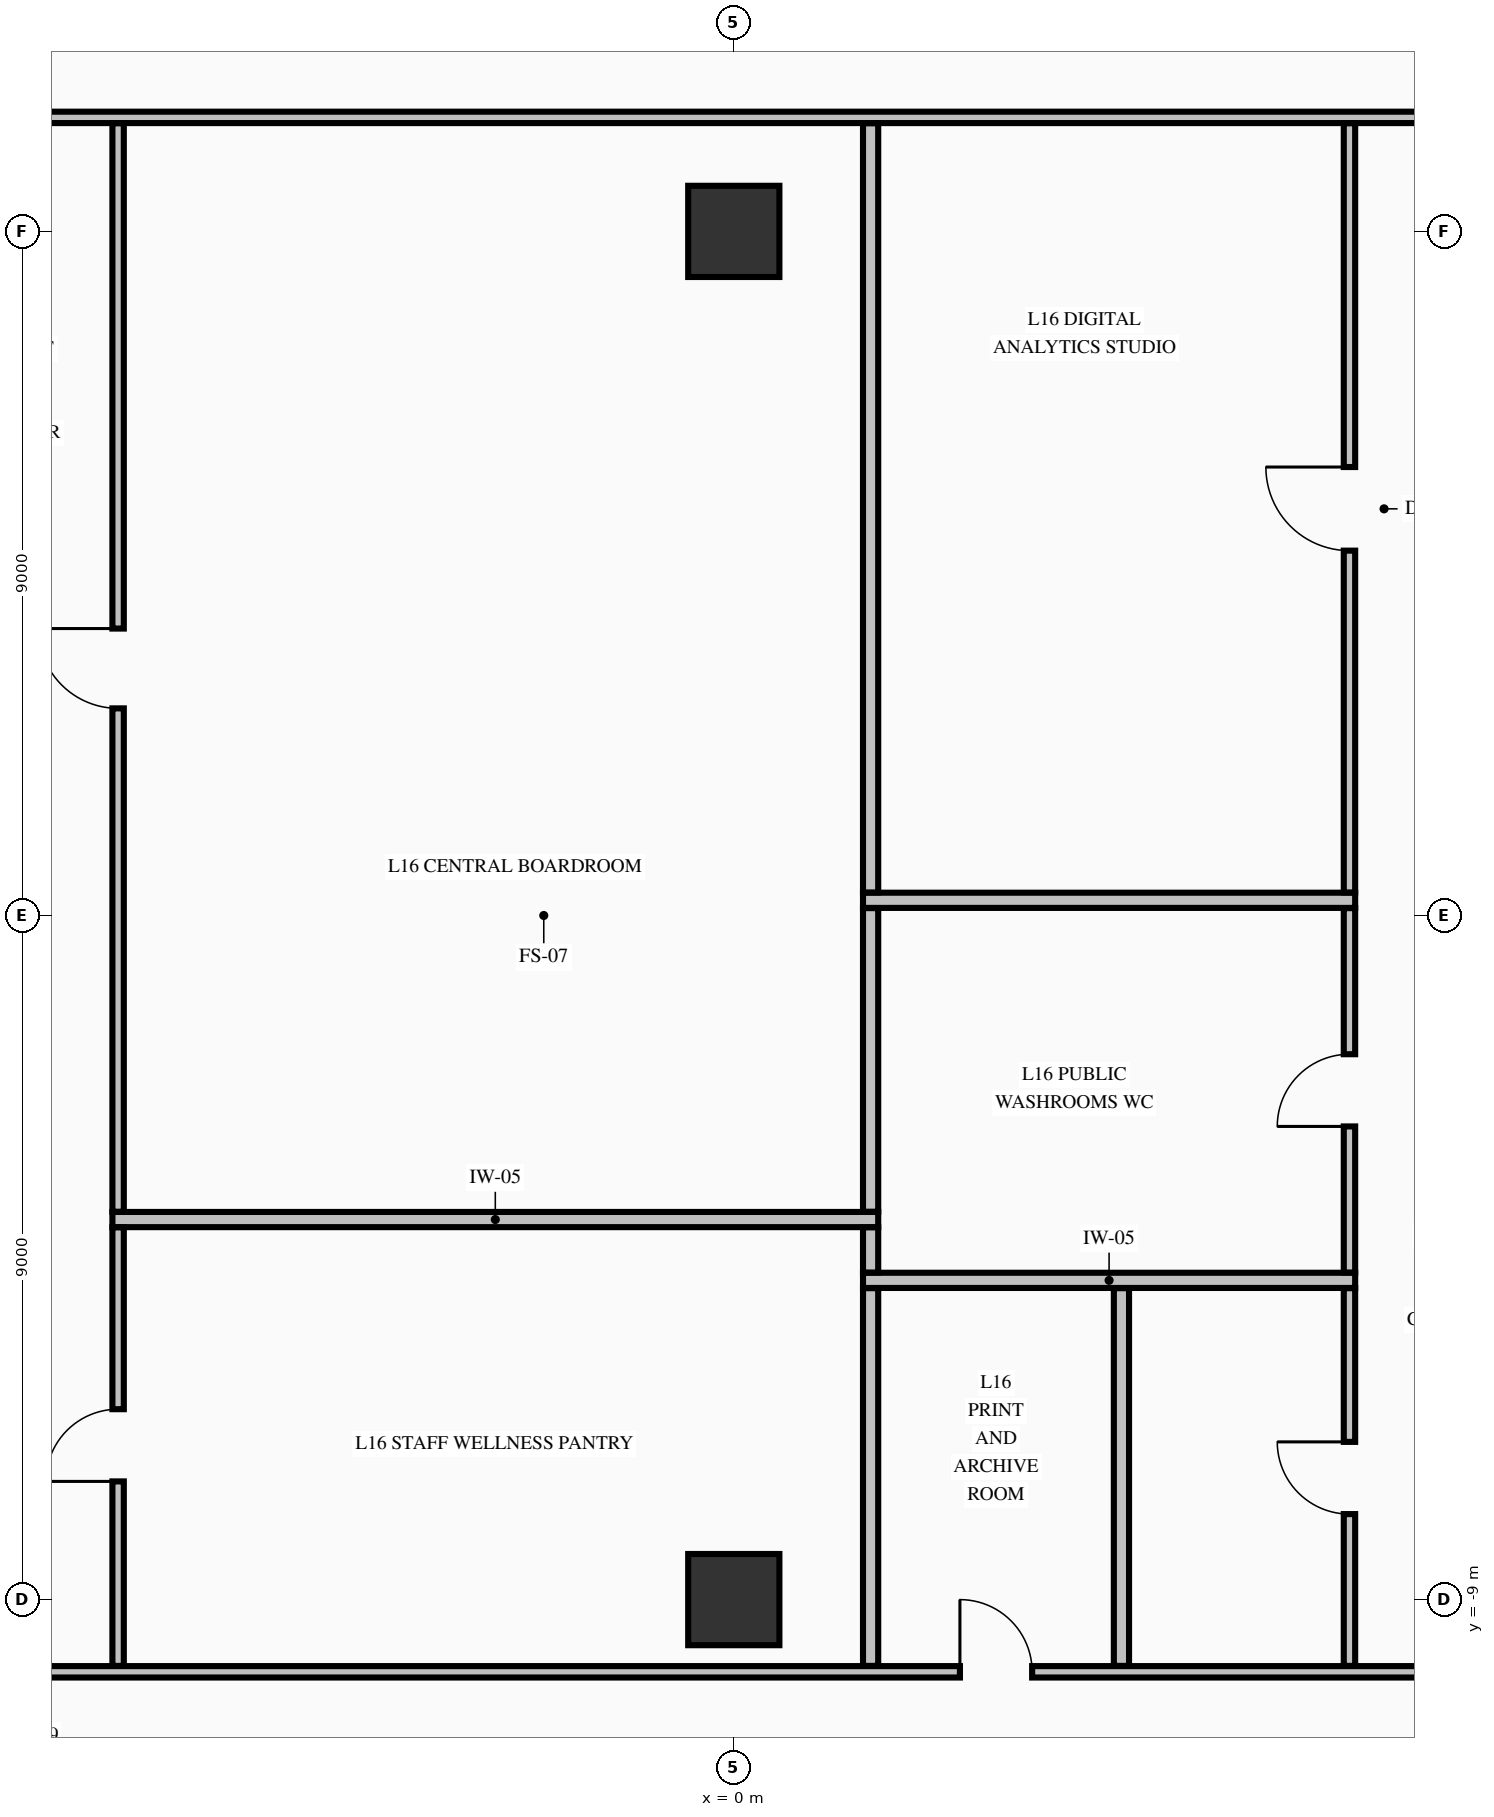
"""IFC4 building model, lengths in metres.
Left out: names, types, materials, properties, quantities, classifications, styles, units other than length and angle.
Written with IfcOpenShell. Run it as: python <this file> out.ifc"""

import sys

from ifc_helpers import new_model, si_unit, direction, frame, frame_2d, origin, origin_2d, place, context, subcontext, project, spatial, rectangle, extrude, element, fill, save


model = new_model("IFC4")
c1 = context("Model", 3, precision=1e-05, world=origin(), true_north=direction((0.0, 1.0)))
c2 = subcontext(c1, "Body", "Model", "MODEL_VIEW")
j1 = project(units=[si_unit("LENGTHUNIT", "METRE"), si_unit("PLANEANGLEUNIT", "RADIAN")], contexts=[c1])
p1 = place(None, origin())
s1 = spatial("IfcSite", under=j1, at=p1, CompositionType="ELEMENT")
p2 = place(p1, origin())
s2 = spatial("IfcBuilding", under=s1, at=p2, CompositionType="ELEMENT")
p3 = place(p2, frame((0.0, 0.0, 67.9)))
s3 = spatial("IfcBuildingStorey", under=s2, at=p3, CompositionType="ELEMENT", Elevation=67.9)
for number, where, z_axis, x_axis in (
    (1, (0.0, -9.0, -0.25), (0.0, 0.0, 1.0), (1.0, 0.0, 0.0)),
    (2, (0.0, 9.0, -0.25), (0.0, 0.0, 1.0), (1.0, 0.0, 0.0)),
):
    element("IfcColumn", number, at=place(p3, frame(where, z_axis=z_axis, x_axis=x_axis)), inside=s3, PredefinedType="COLUMN", context=c2, shape_type="SweptSolid", body=[
        extrude(rectangle(XDim=1.2, YDim=1.2, at=origin_2d()), origin(), (0.0, 0.0, 1.0), 3.495),
    ])
p4 = place(p3, frame((-10.394, -9.95, 0.0), z_axis=(0.0, 0.0, 1.0), x_axis=(1.0, 0.0, 0.0)))
e3 = element("IfcWall", 3, at=p4, inside=s3, PredefinedType="PARTITIONING", context=c2, shape_type="SweptSolid", body=[
    extrude(rectangle(XDim=20.788, YDim=0.15, at=frame_2d((10.394, 0.0))), origin(), (0.0, 0.0, 1.0), 3.245),
])
p5 = place(p4, frame((0.319, 0.0, 0.0)))
e4 = element("IfcOpeningElement", 4, at=p5, cuts=e3, PredefinedType="OPENING", context=c2, shape_type="SweptSolid", body=[
    extrude(rectangle(XDim=1.05, YDim=2.15, at=frame_2d((0.525, 1.075))), frame((0.0, 0.085, 0.0), z_axis=(0.0, -1.0, 0.0), x_axis=(1.0, 0.0, 0.0)), (0.0, 0.0, 1.0), 0.17),
])
p6 = place(p4, frame((19.419, 0.0, 0.0)))
e5 = element("IfcOpeningElement", 5, at=p6, cuts=e3, PredefinedType="OPENING", context=c2, shape_type="SweptSolid", body=[
    extrude(rectangle(XDim=1.05, YDim=2.15, at=frame_2d((0.525, 1.075))), frame((0.0, 0.085, 0.0), z_axis=(0.0, -1.0, 0.0), x_axis=(1.0, 0.0, 0.0)), (0.0, 0.0, 1.0), 0.17),
])
p7 = place(p4, frame((13.369, 0.0, 0.0)))
e6 = element("IfcOpeningElement", 6, at=p7, cuts=e3, PredefinedType="OPENING", context=c2, shape_type="SweptSolid", body=[
    extrude(rectangle(XDim=0.95, YDim=2.15, at=frame_2d((0.475, 1.075))), frame((0.0, 0.085, 0.0), z_axis=(0.0, -1.0, 0.0), x_axis=(1.0, 0.0, 0.0)), (0.0, 0.0, 1.0), 0.17),
])
p8 = place(p3, frame((1.7, -4.8, 0.0), z_axis=(0.0, 0.0, 1.0), x_axis=(1.0, 0.0, 0.0)))
e7 = element("IfcWall", 7, at=p8, inside=s3, PredefinedType="PARTITIONING", context=c2, shape_type="SweptSolid", body=[
    extrude(rectangle(XDim=6.475, YDim=0.2, at=frame_2d((3.238, 0.0))), origin(), (0.0, 0.0, 1.0), 3.245),
])
p9 = place(p3, frame((-8.175, -4.0, 0.0), z_axis=(0.0, 0.0, 1.0), x_axis=(1.0, 0.0, 0.0)))
e8 = element("IfcWall", 8, at=p9, inside=s3, PredefinedType="PARTITIONING", context=c2, shape_type="SweptSolid", body=[
    extrude(rectangle(XDim=10.075, YDim=0.2, at=frame_2d((5.038, 0.0))), origin(), (0.0, 0.0, 1.0), 3.245),
])
p10 = place(p3, frame((1.7, 0.2, 0.0), z_axis=(0.0, 0.0, 1.0), x_axis=(1.0, 0.0, 0.0)))
e9 = element("IfcWall", 9, at=p10, inside=s3, PredefinedType="PARTITIONING", context=c2, shape_type="SweptSolid", body=[
    extrude(rectangle(XDim=6.475, YDim=0.2, at=frame_2d((3.238, 0.0))), origin(), (0.0, 0.0, 1.0), 3.245),
])
p11 = place(p3, frame((-10.394, 10.5, 0.0), z_axis=(0.0, 0.0, 1.0), x_axis=(1.0, 0.0, 0.0)))
e10 = element("IfcWall", 10, at=p11, inside=s3, PredefinedType="PARTITIONING", context=c2, shape_type="SweptSolid", body=[
    extrude(rectangle(XDim=20.788, YDim=0.15, at=frame_2d((10.394, 0.0))), origin(), (0.0, 0.0, 1.0), 3.245),
])
p12 = place(p11, frame((0.319, 0.0, 0.0)))
e11 = element("IfcOpeningElement", 11, at=p12, cuts=e10, PredefinedType="OPENING", context=c2, shape_type="SweptSolid", body=[
    extrude(rectangle(XDim=1.05, YDim=2.15, at=frame_2d((0.525, 1.075))), frame((0.0, 0.085, 0.0), z_axis=(0.0, -1.0, 0.0), x_axis=(1.0, 0.0, 0.0)), (0.0, 0.0, 1.0), 0.17),
])
p13 = place(p11, frame((19.419, 0.0, 0.0)))
e12 = element("IfcOpeningElement", 12, at=p13, cuts=e10, PredefinedType="OPENING", context=c2, shape_type="SweptSolid", body=[
    extrude(rectangle(XDim=1.05, YDim=2.15, at=frame_2d((0.525, 1.075))), frame((0.0, 0.085, 0.0), z_axis=(0.0, -1.0, 0.0), x_axis=(1.0, 0.0, 0.0)), (0.0, 0.0, 1.0), 0.17),
])
p14 = place(p3, frame((-8.1, -9.872, 0.0), z_axis=(0.0, 0.0, 1.0), x_axis=(0.0, 1.0, 0.0)))
e13 = element("IfcWall", 13, at=p14, inside=s3, PredefinedType="PARTITIONING", context=c2, shape_type="SweptSolid", body=[
    extrude(rectangle(XDim=5.769, YDim=0.15, at=frame_2d((2.885, 0.0))), origin(), (0.0, 0.0, 1.0), 3.245),
])
p15 = place(p14, frame((2.427, 0.0, 0.0)))
e14 = element("IfcOpeningElement", 14, at=p15, cuts=e13, PredefinedType="OPENING", context=c2, shape_type="SweptSolid", body=[
    extrude(rectangle(XDim=0.95, YDim=2.15, at=frame_2d((0.475, 1.075))), frame((0.0, 0.085, 0.0), z_axis=(0.0, -1.0, 0.0), x_axis=(1.0, 0.0, 0.0)), (0.0, 0.0, 1.0), 0.17),
])
p16 = place(p3, frame((-8.1, -3.897, 0.0), z_axis=(0.0, 0.0, 1.0), x_axis=(0.0, 1.0, 0.0)))
e15 = element("IfcWall", 15, at=p16, inside=s3, PredefinedType="PARTITIONING", context=c2, shape_type="SweptSolid", body=[
    extrude(rectangle(XDim=14.319, YDim=0.15, at=frame_2d((7.16, 0.0))), origin(), (0.0, 0.0, 1.0), 3.245),
])
p17 = place(p16, frame((6.622, 0.0, 0.0)))
e16 = element("IfcOpeningElement", 16, at=p17, cuts=e15, PredefinedType="OPENING", context=c2, shape_type="SweptSolid", body=[
    extrude(rectangle(XDim=1.05, YDim=2.15, at=frame_2d((0.525, 1.075))), frame((0.0, 0.085, 0.0), z_axis=(0.0, -1.0, 0.0), x_axis=(1.0, 0.0, 0.0)), (0.0, 0.0, 1.0), 0.17),
])
p18 = place(p3, frame((1.8, -9.872, 0.0), z_axis=(0.0, 0.0, 1.0), x_axis=(0.0, 1.0, 0.0)))
e17 = element("IfcWall", 17, at=p18, inside=s3, PredefinedType="PARTITIONING", context=c2, shape_type="SweptSolid", body=[
    extrude(rectangle(XDim=4.969, YDim=0.2, at=frame_2d((2.484, 0.0))), origin(), (0.0, 0.0, 1.0), 3.245),
])
p19 = place(p3, frame((1.8, -4.697, 0.0), z_axis=(0.0, 0.0, 1.0), x_axis=(0.0, 1.0, 0.0)))
e18 = element("IfcWall", 18, at=p19, inside=s3, PredefinedType="PARTITIONING", context=c2, shape_type="SweptSolid", body=[
    extrude(rectangle(XDim=0.594, YDim=0.2, at=frame_2d((0.297, 0.0))), origin(), (0.0, 0.0, 1.0), 3.245),
])
p20 = place(p3, frame((1.8, -3.897, 0.0), z_axis=(0.0, 0.0, 1.0), x_axis=(0.0, 1.0, 0.0)))
e19 = element("IfcWall", 19, at=p20, inside=s3, PredefinedType="PARTITIONING", context=c2, shape_type="SweptSolid", body=[
    extrude(rectangle(XDim=3.994, YDim=0.2, at=frame_2d((1.997, 0.0))), origin(), (0.0, 0.0, 1.0), 3.245),
])
p21 = place(p3, frame((1.8, 0.303, 0.0), z_axis=(0.0, 0.0, 1.0), x_axis=(0.0, 1.0, 0.0)))
e20 = element("IfcWall", 20, at=p21, inside=s3, PredefinedType="PARTITIONING", context=c2, shape_type="SweptSolid", body=[
    extrude(rectangle(XDim=10.119, YDim=0.2, at=frame_2d((5.06, 0.0))), origin(), (0.0, 0.0, 1.0), 3.245),
])
p22 = place(p3, frame((5.1, -9.872, 0.0), z_axis=(0.0, 0.0, 1.0), x_axis=(0.0, 1.0, 0.0)))
e21 = element("IfcWall", 21, at=p22, inside=s3, PredefinedType="PARTITIONING", context=c2, shape_type="SweptSolid", body=[
    extrude(rectangle(XDim=4.969, YDim=0.2, at=frame_2d((2.484, 0.0))), origin(), (0.0, 0.0, 1.0), 3.245),
])
p23 = place(p3, frame((8.1, -9.872, 0.0), z_axis=(0.0, 0.0, 1.0), x_axis=(0.0, 1.0, 0.0)))
e22 = element("IfcWall", 22, at=p23, inside=s3, PredefinedType="PARTITIONING", context=c2, shape_type="SweptSolid", body=[
    extrude(rectangle(XDim=4.969, YDim=0.15, at=frame_2d((2.484, 0.0))), origin(), (0.0, 0.0, 1.0), 3.245),
])
p24 = place(p23, frame((1.997, 0.0, 0.0)))
e23 = element("IfcOpeningElement", 23, at=p24, cuts=e22, PredefinedType="OPENING", context=c2, shape_type="SweptSolid", body=[
    extrude(rectangle(XDim=0.95, YDim=2.15, at=frame_2d((0.475, 1.075))), frame((0.0, 0.085, 0.0), z_axis=(0.0, -1.0, 0.0), x_axis=(1.0, 0.0, 0.0)), (0.0, 0.0, 1.0), 0.17),
])
p25 = place(p3, frame((8.1, -4.697, 0.0), z_axis=(0.0, 0.0, 1.0), x_axis=(0.0, 1.0, 0.0)))
e24 = element("IfcWall", 24, at=p25, inside=s3, PredefinedType="PARTITIONING", context=c2, shape_type="SweptSolid", body=[
    extrude(rectangle(XDim=4.794, YDim=0.15, at=frame_2d((2.397, 0.0))), origin(), (0.0, 0.0, 1.0), 3.245),
])
p26 = place(p25, frame((1.922, 0.0, 0.0)))
e25 = element("IfcOpeningElement", 25, at=p26, cuts=e24, PredefinedType="OPENING", context=c2, shape_type="SweptSolid", body=[
    extrude(rectangle(XDim=0.95, YDim=2.15, at=frame_2d((0.475, 1.075))), frame((0.0, 0.085, 0.0), z_axis=(0.0, -1.0, 0.0), x_axis=(1.0, 0.0, 0.0)), (0.0, 0.0, 1.0), 0.17),
])
p27 = place(p3, frame((8.1, 0.303, 0.0), z_axis=(0.0, 0.0, 1.0), x_axis=(0.0, 1.0, 0.0)))
e26 = element("IfcWall", 26, at=p27, inside=s3, PredefinedType="PARTITIONING", context=c2, shape_type="SweptSolid", body=[
    extrude(rectangle(XDim=10.119, YDim=0.15, at=frame_2d((5.06, 0.0))), origin(), (0.0, 0.0, 1.0), 3.245),
])
p28 = place(p27, frame((4.497, 0.0, 0.0)))
e27 = element("IfcOpeningElement", 27, at=p28, cuts=e26, PredefinedType="OPENING", context=c2, shape_type="SweptSolid", body=[
    extrude(rectangle(XDim=1.1, YDim=2.15, at=frame_2d((0.55, 1.075))), frame((0.0, 0.085, 0.0), z_axis=(0.0, -1.0, 0.0), x_axis=(1.0, 0.0, 0.0)), (0.0, 0.0, 1.0), 0.17),
])
p29 = place(p17, origin())
e28 = element("IfcDoor", 28, at=p29, inside=s3, OperationType="SINGLE_SWING_RIGHT", PredefinedType="DOOR", context=c2, shape_type="SweptSolid", body=[
    extrude(rectangle(XDim=1.05, YDim=2.15, at=frame_2d((0.525, 1.075))), frame((0.0, 0.025, 0.0), z_axis=(0.0, -1.0, 0.0), x_axis=(1.0, 0.0, 0.0)), (0.0, 0.0, 1.0), 0.05),
])
fill(e16, e28)
p30 = place(p15, origin())
e29 = element("IfcDoor", 29, at=p30, inside=s3, OperationType="SINGLE_SWING_LEFT", PredefinedType="DOOR", context=c2, shape_type="SweptSolid", body=[
    extrude(rectangle(XDim=0.95, YDim=2.15, at=frame_2d((0.475, 1.075))), frame((0.0, 0.025, 0.0), z_axis=(0.0, -1.0, 0.0), x_axis=(1.0, 0.0, 0.0)), (0.0, 0.0, 1.0), 0.05),
])
fill(e14, e29)
p31 = place(p28, origin())
e30 = element("IfcDoor", 30, at=p31, inside=s3, OperationType="SINGLE_SWING_RIGHT", PredefinedType="DOOR", context=c2, shape_type="SweptSolid", body=[
    extrude(rectangle(XDim=1.1, YDim=2.15, at=frame_2d((0.55, 1.075))), frame((0.0, 0.025, 0.0), z_axis=(0.0, -1.0, 0.0), x_axis=(1.0, 0.0, 0.0)), (0.0, 0.0, 1.0), 0.05),
])
fill(e27, e30)
p32 = place(p26, origin())
e31 = element("IfcDoor", 31, at=p32, inside=s3, OperationType="SINGLE_SWING_LEFT", PredefinedType="DOOR", context=c2, shape_type="SweptSolid", body=[
    extrude(rectangle(XDim=0.95, YDim=2.15, at=frame_2d((0.475, 1.075))), frame((0.0, 0.025, 0.0), z_axis=(0.0, -1.0, 0.0), x_axis=(1.0, 0.0, 0.0)), (0.0, 0.0, 1.0), 0.05),
])
fill(e25, e31)
p33 = place(p24, origin())
e32 = element("IfcDoor", 32, at=p33, inside=s3, OperationType="SINGLE_SWING_RIGHT", PredefinedType="DOOR", context=c2, shape_type="SweptSolid", body=[
    extrude(rectangle(XDim=0.95, YDim=2.15, at=frame_2d((0.475, 1.075))), frame((0.0, 0.025, 0.0), z_axis=(0.0, -1.0, 0.0), x_axis=(1.0, 0.0, 0.0)), (0.0, 0.0, 1.0), 0.05),
])
fill(e23, e32)
p34 = place(p7, origin())
e33 = element("IfcDoor", 33, at=p34, inside=s3, OperationType="SINGLE_SWING_LEFT", PredefinedType="DOOR", context=c2, shape_type="SweptSolid", body=[
    extrude(rectangle(XDim=0.95, YDim=2.15, at=frame_2d((0.475, 1.075))), frame((0.0, 0.025, 0.0), z_axis=(0.0, -1.0, 0.0), x_axis=(1.0, 0.0, 0.0)), (0.0, 0.0, 1.0), 0.05),
])
fill(e6, e33)
save(model, sys.argv[1])
